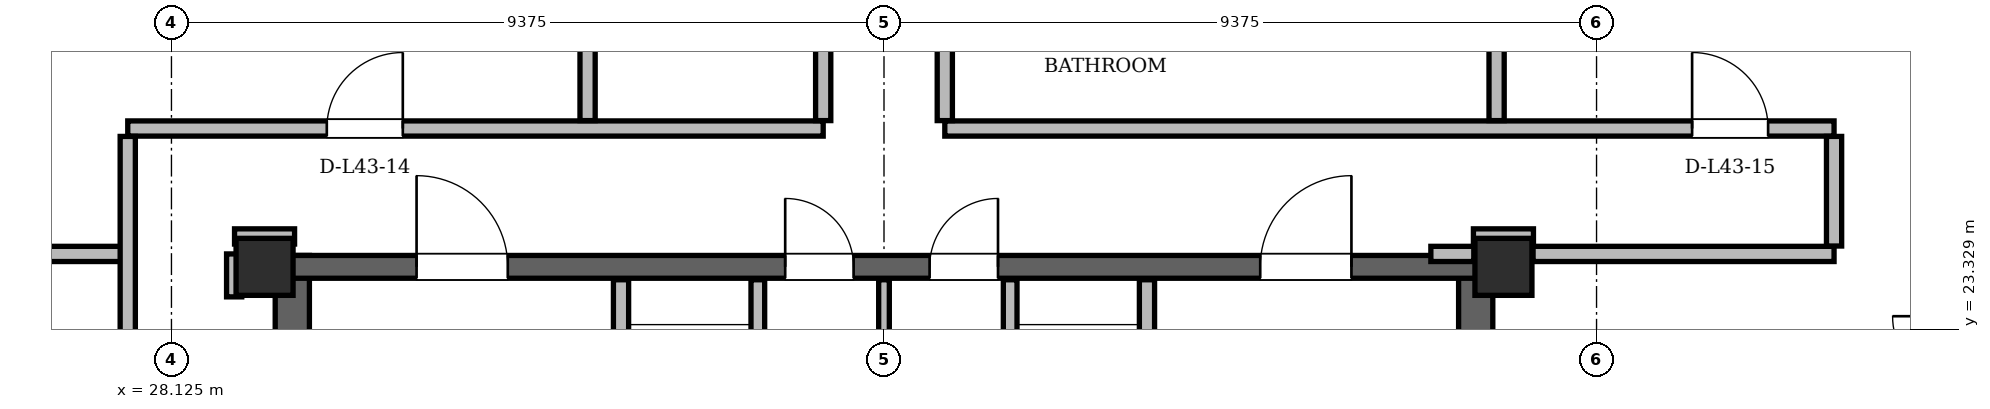
"""IFC4 building model, lengths in metres.
Left out: names, types, materials, properties, quantities, classifications, styles, units other than length and angle.
Written with IfcOpenShell. Run it as: python <this file> out.ifc"""

import sys

from ifc_helpers import new_model, si_unit, direction, frame, frame_2d, origin, origin_2d, place, context, subcontext, project, spatial, rectangle, hollow_rectangle, extrude, element, fill, save


model = new_model("IFC4")
c1 = context("Model", 3, precision=1e-05, world=origin(), true_north=direction((0.0, 1.0)))
c2 = subcontext(c1, "Body", "Model", "MODEL_VIEW")
j1 = project(units=[si_unit("LENGTHUNIT", "METRE"), si_unit("PLANEANGLEUNIT", "RADIAN")], contexts=[c1])
p1 = place(None, origin())
s1 = spatial("IfcSite", under=j1, at=p1, CompositionType="ELEMENT")
p2 = place(p1, origin())
s2 = spatial("IfcBuilding", under=s1, at=p2, CompositionType="ELEMENT")
p3 = place(p2, frame((0.0, 0.0, 163.8)))
s3 = spatial("IfcBuildingStorey", under=s2, at=p3, CompositionType="ELEMENT", Elevation=163.8)
for number, where, z_axis, x_axis in (
    (1, (45.65, 24.15, 0.0), (0.0, 0.0, 1.0), (1.0, 0.0, 0.0)),
    (2, (29.35, 24.15, 0.0), (0.0, 0.0, 1.0), (1.0, 0.0, 0.0)),
):
    element("IfcColumn", number, at=place(p3, frame(where, z_axis=z_axis, x_axis=x_axis)), inside=s3, PredefinedType="COLUMN", context=c2, shape_type="SweptSolid", body=[
        extrude(hollow_rectangle(XDim=0.75, YDim=0.75, WallThickness=0.06, at=origin_2d()), origin(), (0.0, 0.0, 1.0), 3.6),
    ])
for number, where, z_axis, x_axis in (
    (3, (29.715, 11.0, 0.0), (0.0, 0.0, 1.0), (0.0, 1.0, 0.0)),
    (4, (45.285, 11.0, 0.0), (0.0, 0.0, 1.0), (0.0, 1.0, 0.0)),
):
    element("IfcWall", number, at=place(p3, frame(where, z_axis=z_axis, x_axis=x_axis)), inside=s3, PredefinedType="SHEAR", context=c2, shape_type="SweptSolid", body=[
        extrude(rectangle(XDim=13.3, YDim=0.45, at=frame_2d((6.65, 0.0))), origin(), (0.0, 0.0, 1.0), 3.38),
    ])
p4 = place(p3, frame((29.65, 24.15, 0.0), z_axis=(0.0, 0.0, 1.0), x_axis=(1.0, 0.0, 0.0)))
e5 = element("IfcWall", 5, at=p4, inside=s3, PredefinedType="SHEAR", context=c2, shape_type="SweptSolid", body=[
    extrude(rectangle(XDim=15.7, YDim=0.3, at=frame_2d((7.85, 0.0))), origin(), (0.0, 0.0, 1.0), 3.38),
])
p5 = place(p4, frame((1.7, 0.0, 0.0)))
e6 = element("IfcOpeningElement", 6, at=p5, cuts=e5, PredefinedType="OPENING", context=c2, shape_type="SweptSolid", body=[
    extrude(rectangle(XDim=1.2, YDim=2.2, at=frame_2d((0.6, 1.1))), frame((0.0, 0.15, 0.0), z_axis=(0.0, -1.0, 0.0), x_axis=(1.0, 0.0, 0.0)), (0.0, 0.0, 1.0), 0.3),
])
p6 = place(p4, frame((12.8, 0.0, 0.0)))
e7 = element("IfcOpeningElement", 7, at=p6, cuts=e5, PredefinedType="OPENING", context=c2, shape_type="SweptSolid", body=[
    extrude(rectangle(XDim=1.2, YDim=2.2, at=frame_2d((0.6, 1.1))), frame((0.0, 0.15, 0.0), z_axis=(0.0, -1.0, 0.0), x_axis=(1.0, 0.0, 0.0)), (0.0, 0.0, 1.0), 0.3),
])
p7 = place(p4, frame((6.55, 0.0, 0.0)))
e8 = element("IfcOpeningElement", 8, at=p7, cuts=e5, PredefinedType="OPENING", context=c2, shape_type="SweptSolid", body=[
    extrude(rectangle(XDim=0.9, YDim=2.05, at=frame_2d((0.45, 1.025))), frame((0.0, 0.15, 0.0), z_axis=(0.0, -1.0, 0.0), x_axis=(1.0, 0.0, 0.0)), (0.0, 0.0, 1.0), 0.3),
])
p8 = place(p4, frame((8.45, 0.0, 0.0)))
e9 = element("IfcOpeningElement", 9, at=p8, cuts=e5, PredefinedType="OPENING", context=c2, shape_type="SweptSolid", body=[
    extrude(rectangle(XDim=0.9, YDim=2.05, at=frame_2d((0.45, 1.025))), frame((0.0, 0.15, 0.0), z_axis=(0.0, -1.0, 0.0), x_axis=(1.0, 0.0, 0.0)), (0.0, 0.0, 1.0), 0.3),
])
p9 = place(p3, frame((59.804, 12.344, 0.0), z_axis=(0.0, 0.0, 1.0), x_axis=(-0.499998611639, 0.866026205354, 0.0)))
e10 = element("IfcWall", 10, at=p9, inside=s3, PredefinedType="SOLIDWALL", context=c2, shape_type="SweptSolid", body=[
    extrude(rectangle(XDim=35.738, YDim=0.34, at=frame_2d((17.869, 0.0))), origin(), (0.0, 0.0, 1.0), 2.6),
])
p10 = place(p9, frame((6.579, 0.0, 0.0)))
e11 = element("IfcOpeningElement", 11, at=p10, cuts=e10, PredefinedType="OPENING", context=c2, shape_type="SweptSolid", body=[
    extrude(rectangle(XDim=1.5, YDim=2.2, at=frame_2d((0.75, 1.1))), frame((0.0, 0.17, 0.0), z_axis=(0.0, -1.0, 0.0), x_axis=(1.0, 0.0, 0.0)), (0.0, 0.0, 1.0), 0.34),
])
p11 = place(p9, frame((26.303, 0.0, 0.0)))
e12 = element("IfcOpeningElement", 12, at=p11, cuts=e10, PredefinedType="OPENING", context=c2, shape_type="SweptSolid", body=[
    extrude(rectangle(XDim=1.3, YDim=2.2, at=frame_2d((0.65, 1.1))), frame((0.0, 0.17, 0.0), z_axis=(0.0, -1.0, 0.0), x_axis=(1.0, 0.0, 0.0)), (0.0, 0.0, 1.0), 0.34),
])
p12 = place(p9, frame((1.58, 0.0, 0.85)))
e13 = element("IfcOpeningElement", 13, at=p12, cuts=e10, PredefinedType="OPENING", context=c2, shape_type="SweptSolid", body=[
    extrude(rectangle(XDim=1.2, YDim=1.48, at=frame_2d((0.6, 0.74))), frame((0.0, 0.17, 0.0), z_axis=(0.0, -1.0, 0.0), x_axis=(1.0, 0.0, 0.0)), (0.0, 0.0, 1.0), 0.34),
])
p13 = place(p9, frame((16.77, 0.0, 0.85)))
e14 = element("IfcOpeningElement", 14, at=p13, cuts=e10, PredefinedType="OPENING", context=c2, shape_type="SweptSolid", body=[
    extrude(rectangle(XDim=3.0, YDim=1.64, at=frame_2d((1.5, 0.82))), frame((0.0, 0.17, 0.0), z_axis=(0.0, -1.0, 0.0), x_axis=(1.0, 0.0, 0.0)), (0.0, 0.0, 1.0), 0.34),
])
p14 = place(p9, frame((22.8, 0.0, 0.85)))
e15 = element("IfcOpeningElement", 15, at=p14, cuts=e10, PredefinedType="OPENING", context=c2, shape_type="SweptSolid", body=[
    extrude(rectangle(XDim=1.2, YDim=1.48, at=frame_2d((0.6, 0.74))), frame((0.0, 0.17, 0.0), z_axis=(0.0, -1.0, 0.0), x_axis=(1.0, 0.0, 0.0)), (0.0, 0.0, 1.0), 0.34),
])
p15 = place(p9, frame((13.242, 0.0, 0.85)))
e16 = element("IfcOpeningElement", 16, at=p15, cuts=e10, PredefinedType="OPENING", context=c2, shape_type="SweptSolid", body=[
    extrude(rectangle(XDim=1.2, YDim=1.48, at=frame_2d((0.6, 0.74))), frame((0.0, 0.17, 0.0), z_axis=(0.0, -1.0, 0.0), x_axis=(1.0, 0.0, 0.0)), (0.0, 0.0, 1.0), 0.34),
])
p16 = place(p9, frame((31.395, 0.0, 0.85)))
e17 = element("IfcOpeningElement", 17, at=p16, cuts=e10, PredefinedType="OPENING", context=c2, shape_type="SweptSolid", body=[
    extrude(rectangle(XDim=3.0, YDim=1.64, at=frame_2d((1.5, 0.82))), frame((0.0, 0.17, 0.0), z_axis=(0.0, -1.0, 0.0), x_axis=(1.0, 0.0, 0.0)), (0.0, 0.0, 1.0), 0.34),
])
p17 = place(p3, frame((33.065, 43.294, 0.0), z_axis=(0.0, 0.0, 1.0), x_axis=(-0.499998611639, -0.866026205354, 0.0)))
e18 = element("IfcWall", 18, at=p17, inside=s3, PredefinedType="SOLIDWALL", context=c2, shape_type="SweptSolid", body=[
    extrude(rectangle(XDim=35.738, YDim=0.34, at=frame_2d((17.869, 0.0))), origin(), (0.0, 0.0, 1.0), 2.6),
])
p18 = place(p17, frame((6.76, 0.0, 0.0)))
e19 = element("IfcOpeningElement", 19, at=p18, cuts=e18, PredefinedType="OPENING", context=c2, shape_type="SweptSolid", body=[
    extrude(rectangle(XDim=1.0, YDim=2.18, at=frame_2d((0.5, 1.09))), frame((0.0, 0.17, 0.0), z_axis=(0.0, -1.0, 0.0), x_axis=(1.0, 0.0, 0.0)), (0.0, 0.0, 1.0), 0.34),
])
p19 = place(p17, frame((26.624, 0.0, 0.0)))
e20 = element("IfcOpeningElement", 20, at=p19, cuts=e18, PredefinedType="OPENING", context=c2, shape_type="SweptSolid", body=[
    extrude(rectangle(XDim=1.5, YDim=2.2, at=frame_2d((0.75, 1.1))), frame((0.0, 0.17, 0.0), z_axis=(0.0, -1.0, 0.0), x_axis=(1.0, 0.0, 0.0)), (0.0, 0.0, 1.0), 0.34),
])
p20 = place(p17, frame((33.648, 0.0, 0.85)))
e21 = element("IfcOpeningElement", 21, at=p20, cuts=e18, PredefinedType="OPENING", context=c2, shape_type="SweptSolid", body=[
    extrude(rectangle(XDim=1.2, YDim=1.48, at=frame_2d((0.6, 0.74))), frame((0.0, 0.17, 0.0), z_axis=(0.0, -1.0, 0.0), x_axis=(1.0, 0.0, 0.0)), (0.0, 0.0, 1.0), 0.34),
])
p21 = place(p17, frame((22.24, 0.0, 0.85)))
e22 = element("IfcOpeningElement", 22, at=p21, cuts=e18, PredefinedType="OPENING", context=c2, shape_type="SweptSolid", body=[
    extrude(rectangle(XDim=1.2, YDim=1.48, at=frame_2d((0.6, 0.74))), frame((0.0, 0.17, 0.0), z_axis=(0.0, -1.0, 0.0), x_axis=(1.0, 0.0, 0.0)), (0.0, 0.0, 1.0), 0.34),
])
p22 = place(p17, frame((11.751, 0.0, 0.85)))
e23 = element("IfcOpeningElement", 23, at=p22, cuts=e18, PredefinedType="OPENING", context=c2, shape_type="SweptSolid", body=[
    extrude(rectangle(XDim=2.2, YDim=1.64, at=frame_2d((1.1, 0.82))), frame((0.0, 0.17, 0.0), z_axis=(0.0, -1.0, 0.0), x_axis=(1.0, 0.0, 0.0)), (0.0, 0.0, 1.0), 0.34),
])
p23 = place(p17, frame((18.248, 0.0, 0.85)))
e24 = element("IfcOpeningElement", 24, at=p23, cuts=e18, PredefinedType="OPENING", context=c2, shape_type="SweptSolid", body=[
    extrude(rectangle(XDim=1.6, YDim=1.64, at=frame_2d((0.8, 0.82))), frame((0.0, 0.17, 0.0), z_axis=(0.0, -1.0, 0.0), x_axis=(1.0, 0.0, 0.0)), (0.0, 0.0, 1.0), 0.34),
])
p24 = place(p17, frame((1.139, 0.0, 0.85)))
e25 = element("IfcOpeningElement", 25, at=p24, cuts=e18, PredefinedType="OPENING", context=c2, shape_type="SweptSolid", body=[
    extrude(rectangle(XDim=1.8, YDim=1.64, at=frame_2d((0.9, 0.82))), frame((0.0, 0.17, 0.0), z_axis=(0.0, -1.0, 0.0), x_axis=(1.0, 0.0, 0.0)), (0.0, 0.0, 1.0), 0.34),
])
p25 = place(p17, frame((30.5, 0.0, 0.85)))
e26 = element("IfcOpeningElement", 26, at=p25, cuts=e18, PredefinedType="OPENING", context=c2, shape_type="SweptSolid", body=[
    extrude(rectangle(XDim=1.2, YDim=1.48, at=frame_2d((0.6, 0.74))), frame((0.0, 0.17, 0.0), z_axis=(0.0, -1.0, 0.0), x_axis=(1.0, 0.0, 0.0)), (0.0, 0.0, 1.0), 0.34),
])
p26 = place(p3, frame((34.04, 19.48, 0.0), z_axis=(0.0, 0.0, 1.0), x_axis=(0.0, 1.0, 0.0)))
e27 = element("IfcWall", 27, at=p26, inside=s3, PredefinedType="PARTITIONING", context=c2, shape_type="SweptSolid", body=[
    extrude(rectangle(XDim=4.5, YDim=0.2, at=frame_2d((2.25, 0.0))), origin(), (0.0, 0.0, 1.0), 2.42),
])
p27 = place(p26, frame((2.12, 0.0, 0.0)))
e28 = element("IfcOpeningElement", 28, at=p27, cuts=e27, PredefinedType="OPENING", context=c2, shape_type="SweptSolid", body=[
    extrude(rectangle(XDim=1.1, YDim=2.2, at=frame_2d((0.55, 1.1))), frame((0.0, 0.1, 0.0), z_axis=(0.0, -1.0, 0.0), x_axis=(1.0, 0.0, 0.0)), (0.0, 0.0, 1.0), 0.2),
])
p28 = place(p3, frame((35.84, 20.96, 0.0), z_axis=(0.0, 0.0, 1.0), x_axis=(0.0, 1.0, 0.0)))
e29 = element("IfcWall", 29, at=p28, inside=s3, PredefinedType="PARTITIONING", context=c2, shape_type="SweptSolid", body=[
    extrude(rectangle(XDim=3.02, YDim=0.18, at=frame_2d((1.51, 0.0))), origin(), (0.0, 0.0, 1.0), 2.42),
])
p29 = place(p3, frame((40.96, 19.48, 0.0), z_axis=(0.0, 0.0, 1.0), x_axis=(0.0, 1.0, 0.0)))
e30 = element("IfcWall", 30, at=p29, inside=s3, PredefinedType="PARTITIONING", context=c2, shape_type="SweptSolid", body=[
    extrude(rectangle(XDim=4.5, YDim=0.2, at=frame_2d((2.25, 0.0))), origin(), (0.0, 0.0, 1.0), 2.42),
])
p30 = place(p29, frame((2.12, 0.0, 0.0)))
e31 = element("IfcOpeningElement", 31, at=p30, cuts=e30, PredefinedType="OPENING", context=c2, shape_type="SweptSolid", body=[
    extrude(rectangle(XDim=1.1, YDim=2.2, at=frame_2d((0.55, 1.1))), frame((0.0, 0.1, 0.0), z_axis=(0.0, -1.0, 0.0), x_axis=(1.0, 0.0, 0.0)), (0.0, 0.0, 1.0), 0.2),
])
p31 = place(p3, frame((39.16, 20.96, 0.0), z_axis=(0.0, 0.0, 1.0), x_axis=(0.0, 1.0, 0.0)))
e32 = element("IfcWall", 32, at=p31, inside=s3, PredefinedType="PARTITIONING", context=c2, shape_type="SweptSolid", body=[
    extrude(rectangle(XDim=3.02, YDim=0.18, at=frame_2d((1.51, 0.0))), origin(), (0.0, 0.0, 1.0), 2.42),
])
p32 = place(p3, frame((37.5, 21.06, 0.0), z_axis=(0.0, 0.0, 1.0), x_axis=(0.0, 1.0, 0.0)))
e33 = element("IfcWall", 33, at=p32, inside=s3, PredefinedType="PARTITIONING", context=c2, shape_type="SweptSolid", body=[
    extrude(rectangle(XDim=2.92, YDim=0.14, at=frame_2d((1.46, 0.0))), origin(), (0.0, 0.0, 1.0), 2.42),
])
p33 = place(p3, frame((22.311, 24.32, 0.0), z_axis=(0.0, 0.0, 1.0), x_axis=(1.0, 0.0, 0.0)))
e34 = element("IfcWall", 34, at=p33, inside=s3, PredefinedType="PARTITIONING", context=c2, shape_type="SweptSolid", body=[
    extrude(rectangle(XDim=5.239, YDim=0.2, at=frame_2d((2.62, 0.0))), origin(), (0.0, 0.0, 1.0), 3.38),
])
p34 = place(p3, frame((44.695, 24.32, 0.0), z_axis=(0.0, 0.0, 1.0), x_axis=(1.0, 0.0, 0.0)))
e35 = element("IfcWall", 35, at=p34, inside=s3, PredefinedType="PARTITIONING", context=c2, shape_type="SweptSolid", body=[
    extrude(rectangle(XDim=0.565, YDim=0.2, at=frame_2d((0.282, 0.0))), origin(), (0.0, 0.0, 1.0), 2.42),
])
p35 = place(p3, frame((46.04, 24.32, 0.0), z_axis=(0.0, 0.0, 1.0), x_axis=(1.0, 0.0, 0.0)))
e36 = element("IfcWall", 36, at=p35, inside=s3, PredefinedType="PARTITIONING", context=c2, shape_type="SweptSolid", body=[
    extrude(rectangle(XDim=3.96, YDim=0.2, at=frame_2d((1.98, 0.0))), origin(), (0.0, 0.0, 1.0), 3.38),
])
for number, where, z_axis, x_axis in (
    (37, (28.955, 24.55, 0.0), (0.0, 0.0, 1.0), (1.0, 0.0, 0.0)),
    (38, (45.255, 24.55, 0.0), (0.0, 0.0, 1.0), (1.0, 0.0, 0.0)),
):
    element("IfcWall", number, at=place(p3, frame(where, z_axis=z_axis, x_axis=x_axis)), inside=s3, PredefinedType="PARTITIONING", context=c2, shape_type="SweptSolid", body=[
        extrude(rectangle(XDim=0.79, YDim=0.2, at=frame_2d((0.395, 0.0))), origin(), (0.0, 0.0, 1.0), 2.842),
    ])
p36 = place(p3, frame((27.55, 25.97, 0.0), z_axis=(0.0, 0.0, 1.0), x_axis=(1.0, 0.0, 0.0)))
e39 = element("IfcWall", 39, at=p36, inside=s3, PredefinedType="PARTITIONING", context=c2, shape_type="SweptSolid", body=[
    extrude(rectangle(XDim=9.15, YDim=0.2, at=frame_2d((4.575, 0.0))), origin(), (0.0, 0.0, 1.0), 2.842),
])
p37 = place(p36, frame((2.619, 0.0, 0.0)))
e40 = element("IfcOpeningElement", 40, at=p37, cuts=e39, PredefinedType="OPENING", context=c2, shape_type="SweptSolid", body=[
    extrude(rectangle(XDim=1.0, YDim=2.18, at=frame_2d((0.5, 1.09))), frame((0.0, 0.1, 0.0), z_axis=(0.0, -1.0, 0.0), x_axis=(1.0, 0.0, 0.0)), (0.0, 0.0, 1.0), 0.2),
])
p38 = place(p3, frame((38.3, 25.97, 0.0), z_axis=(0.0, 0.0, 1.0), x_axis=(1.0, 0.0, 0.0)))
e41 = element("IfcWall", 41, at=p38, inside=s3, PredefinedType="PARTITIONING", context=c2, shape_type="SweptSolid", body=[
    extrude(rectangle(XDim=11.7, YDim=0.2, at=frame_2d((5.85, 0.0))), origin(), (0.0, 0.0, 1.0), 2.842),
])
p39 = place(p38, frame((9.832, 0.0, 0.0)))
e42 = element("IfcOpeningElement", 42, at=p39, cuts=e41, PredefinedType="OPENING", context=c2, shape_type="SweptSolid", body=[
    extrude(rectangle(XDim=1.0, YDim=2.18, at=frame_2d((0.5, 1.09))), frame((0.0, 0.1, 0.0), z_axis=(0.0, -1.0, 0.0), x_axis=(1.0, 0.0, 0.0)), (0.0, 0.0, 1.0), 0.2),
])
p40 = place(p3, frame((27.55, 18.554, 0.0), z_axis=(0.0, 0.0, 1.0), x_axis=(0.0, 1.0, 0.0)))
e43 = element("IfcWall", 43, at=p40, inside=s3, PredefinedType="PARTITIONING", context=c2, shape_type="SweptSolid", body=[
    extrude(rectangle(XDim=7.312, YDim=0.2, at=frame_2d((3.656, 0.0))), origin(), (0.0, 0.0, 1.0), 3.38),
])
p41 = place(p3, frame((28.95, 23.755, 0.0), z_axis=(0.0, 0.0, 1.0), x_axis=(0.0, 1.0, 0.0)))
e44 = element("IfcWall", 44, at=p41, inside=s3, PredefinedType="PARTITIONING", context=c2, shape_type="SweptSolid", body=[
    extrude(rectangle(XDim=0.565, YDim=0.2, at=frame_2d((0.283, 0.0))), origin(), (0.0, 0.0, 1.0), 3.38),
])
p42 = place(p3, frame((33.6, 26.074, 0.0), z_axis=(0.0, 0.0, 1.0), x_axis=(0.0, 1.0, 0.0)))
e45 = element("IfcWall", 45, at=p42, inside=s3, PredefinedType="PARTITIONING", context=c2, shape_type="SweptSolid", body=[
    extrude(rectangle(XDim=17.046, YDim=0.2, at=frame_2d((8.523, 0.0))), origin(), (0.0, 0.0, 1.0), 3.38),
])
p43 = place(p3, frame((36.7, 26.074, 0.0), z_axis=(0.0, 0.0, 1.0), x_axis=(0.0, 1.0, 0.0)))
e46 = element("IfcWall", 46, at=p43, inside=s3, PredefinedType="PARTITIONING", context=c2, shape_type="SweptSolid", body=[
    extrude(rectangle(XDim=17.046, YDim=0.2, at=frame_2d((8.523, 0.0))), origin(), (0.0, 0.0, 1.0), 3.38),
])
p44 = place(p43, frame((8.669, 0.0, 0.0)))
e47 = element("IfcOpeningElement", 47, at=p44, cuts=e46, PredefinedType="OPENING", context=c2, shape_type="SweptSolid", body=[
    extrude(rectangle(XDim=1.0, YDim=2.18, at=frame_2d((0.5, 1.09))), frame((0.0, 0.1, 0.0), z_axis=(0.0, -1.0, 0.0), x_axis=(1.0, 0.0, 0.0)), (0.0, 0.0, 1.0), 0.2),
])
p45 = place(p3, frame((38.3, 26.074, 0.0), z_axis=(0.0, 0.0, 1.0), x_axis=(0.0, 1.0, 0.0)))
e48 = element("IfcWall", 48, at=p45, inside=s3, PredefinedType="PARTITIONING", context=c2, shape_type="SweptSolid", body=[
    extrude(rectangle(XDim=13.422, YDim=0.2, at=frame_2d((6.711, 0.0))), origin(), (0.0, 0.0, 1.0), 3.38),
])
p46 = place(p45, frame((7.066, 0.0, 0.0)))
e49 = element("IfcOpeningElement", 49, at=p46, cuts=e48, PredefinedType="OPENING", context=c2, shape_type="SweptSolid", body=[
    extrude(rectangle(XDim=1.0, YDim=2.18, at=frame_2d((0.5, 1.09))), frame((0.0, 0.1, 0.0), z_axis=(0.0, -1.0, 0.0), x_axis=(1.0, 0.0, 0.0)), (0.0, 0.0, 1.0), 0.2),
])
p47 = place(p3, frame((45.56, 26.074, 0.0), z_axis=(0.0, 0.0, 1.0), x_axis=(0.0, 1.0, 0.0)))
e50 = element("IfcWall", 50, at=p47, inside=s3, PredefinedType="PARTITIONING", context=c2, shape_type="SweptSolid", body=[
    extrude(rectangle(XDim=10.594, YDim=0.2, at=frame_2d((5.297, 0.0))), origin(), (0.0, 0.0, 1.0), 3.38),
])
p48 = place(p3, frame((50.0, 24.424, 0.0), z_axis=(0.0, 0.0, 1.0), x_axis=(0.0, 1.0, 0.0)))
e51 = element("IfcWall", 51, at=p48, inside=s3, PredefinedType="PARTITIONING", context=c2, shape_type="SweptSolid", body=[
    extrude(rectangle(XDim=1.442, YDim=0.2, at=frame_2d((0.721, 0.0))), origin(), (0.0, 0.0, 1.0), 3.38),
])
p49 = place(p13, origin())
e52 = element("IfcWindow", 52, at=p49, inside=s3, PartitioningType="SINGLE_PANEL", PredefinedType="WINDOW", context=c2, shape_type="SweptSolid", body=[
    extrude(rectangle(XDim=3.0, YDim=1.64, at=frame_2d((1.5, 0.82))), frame((0.0, 0.03, 0.0), z_axis=(0.0, -1.0, 0.0), x_axis=(1.0, 0.0, 0.0)), (0.0, 0.0, 1.0), 0.06),
])
fill(e14, e52)
p50 = place(p5, origin())
e53 = element("IfcDoor", 53, at=p50, inside=s3, OperationType="SINGLE_SWING_LEFT", PredefinedType="DOOR", context=c2, shape_type="SweptSolid", body=[
    extrude(rectangle(XDim=1.2, YDim=2.2, at=frame_2d((0.6, 1.1))), frame((0.0, 0.025, 0.0), z_axis=(0.0, -1.0, 0.0), x_axis=(1.0, 0.0, 0.0)), (0.0, 0.0, 1.0), 0.05),
])
fill(e6, e53)
p51 = place(p6, origin())
e54 = element("IfcDoor", 54, at=p51, inside=s3, OperationType="SINGLE_SWING_RIGHT", PredefinedType="DOOR", context=c2, shape_type="SweptSolid", body=[
    extrude(rectangle(XDim=1.2, YDim=2.2, at=frame_2d((0.6, 1.1))), frame((0.0, 0.025, 0.0), z_axis=(0.0, -1.0, 0.0), x_axis=(1.0, 0.0, 0.0)), (0.0, 0.0, 1.0), 0.05),
])
fill(e7, e54)
p52 = place(p7, origin())
e55 = element("IfcDoor", 55, at=p52, inside=s3, OperationType="SINGLE_SWING_LEFT", PredefinedType="DOOR", context=c2, shape_type="SweptSolid", body=[
    extrude(rectangle(XDim=0.9, YDim=2.05, at=frame_2d((0.45, 1.025))), frame((0.0, 0.025, 0.0), z_axis=(0.0, -1.0, 0.0), x_axis=(1.0, 0.0, 0.0)), (0.0, 0.0, 1.0), 0.05),
])
fill(e8, e55)
p53 = place(p8, origin())
e56 = element("IfcDoor", 56, at=p53, inside=s3, OperationType="SINGLE_SWING_RIGHT", PredefinedType="DOOR", context=c2, shape_type="SweptSolid", body=[
    extrude(rectangle(XDim=0.9, YDim=2.05, at=frame_2d((0.45, 1.025))), frame((0.0, 0.025, 0.0), z_axis=(0.0, -1.0, 0.0), x_axis=(1.0, 0.0, 0.0)), (0.0, 0.0, 1.0), 0.05),
])
fill(e9, e56)
p54 = place(p37, origin())
e57 = element("IfcDoor", 57, at=p54, inside=s3, OperationType="SINGLE_SWING_RIGHT", PredefinedType="DOOR", context=c2, shape_type="SweptSolid", body=[
    extrude(rectangle(XDim=1.0, YDim=2.18, at=frame_2d((0.5, 1.09))), frame((0.0, 0.025, 0.0), z_axis=(0.0, -1.0, 0.0), x_axis=(1.0, 0.0, 0.0)), (0.0, 0.0, 1.0), 0.05),
])
fill(e40, e57)
p55 = place(p39, origin())
e58 = element("IfcDoor", 58, at=p55, inside=s3, OperationType="SINGLE_SWING_LEFT", PredefinedType="DOOR", context=c2, shape_type="SweptSolid", body=[
    extrude(rectangle(XDim=1.0, YDim=2.18, at=frame_2d((0.5, 1.09))), frame((0.0, 0.025, 0.0), z_axis=(0.0, -1.0, 0.0), x_axis=(1.0, 0.0, 0.0)), (0.0, 0.0, 1.0), 0.05),
])
fill(e42, e58)
save(model, sys.argv[1])
